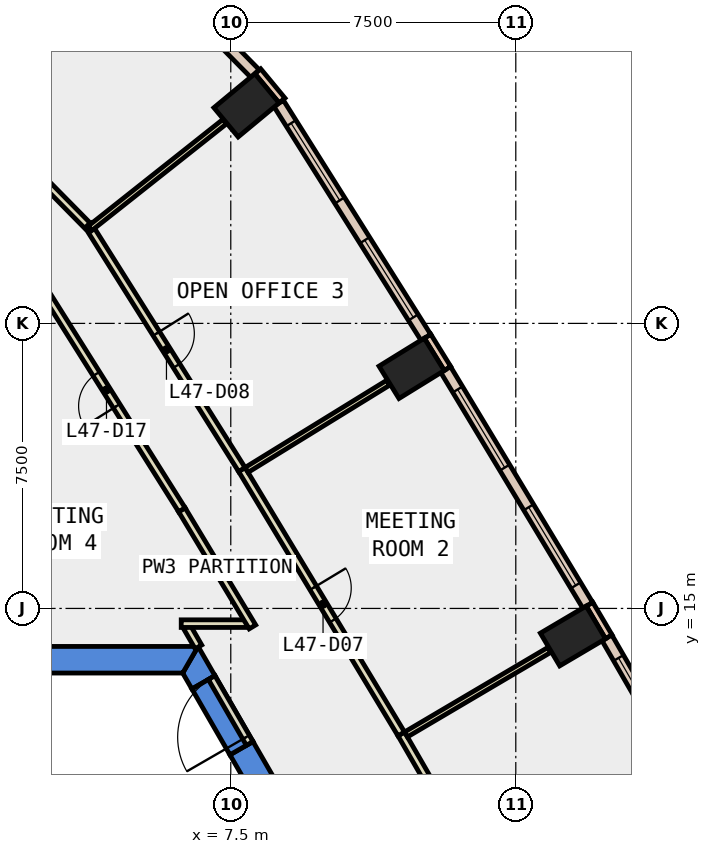
"""IFC4 building model, lengths in metres.
Left out: names, types, materials, properties, quantities, classifications, styles, units other than length and angle.
Written with IfcOpenShell. Run it as: python <this file> out.ifc"""

import sys

from ifc_helpers import new_model, si_unit, direction, frame, frame_2d, origin, origin_2d, place, context, subcontext, project, spatial, polyline, rectangle, outline, extrude, element, fill, save


model = new_model("IFC4")
c1 = context("Model", 3, precision=1e-05, world=origin(), true_north=direction((0.0, 1.0)))
c2 = subcontext(c1, "Body", "Model", "MODEL_VIEW")
j1 = project(units=[si_unit("LENGTHUNIT", "METRE"), si_unit("PLANEANGLEUNIT", "RADIAN")], contexts=[c1])
p1 = place(None, origin())
s1 = spatial("IfcSite", under=j1, at=p1, CompositionType="ELEMENT")
p2 = place(p1, origin())
s2 = spatial("IfcBuilding", under=s1, at=p2, CompositionType="ELEMENT")
p3 = place(p2, frame((0.0, 0.0, 210.8)))
s3 = spatial("IfcBuildingStorey", under=s2, at=p3, CompositionType="ELEMENT", Elevation=210.8)
for number, where, z_axis, x_axis in (
    (1, (16.504, 14.275, -0.4), (0.0, 0.0, 1.0), (-0.509, 0.861, 0.0)),
    (2, (12.259, 21.317, -0.4), (0.0, 0.0, 1.0), (-0.525, 0.851, 0.0)),
    (3, (7.914, 28.238, -0.4), (0.0, 0.0, 1.0), (-0.639, 0.769, 0.0)),
):
    element("IfcColumn", number, at=place(p3, frame(where, z_axis=z_axis, x_axis=x_axis)), inside=s3, PredefinedType="COLUMN", context=c2, shape_type="SweptSolid", body=[
        extrude(rectangle(XDim=1.0, YDim=1.4, at=origin_2d()), origin(), (0.0, 0.0, 1.0), 4.2),
    ])
p4 = place(p3, frame((0.0, 0.0, -0.4)))
e4 = element("IfcWall", 4, at=p4, inside=s3, PredefinedType="SHEAR", context=c2, shape_type="SweptSolid", body=[
    extrude(outline(polyline([(8.084, 11.498), (7.478, 11.148), (12.471, 2.5), (13.279, 2.5), (8.084, 11.498)])), origin(), (0.0, 0.0, 1.0), 4.2),
])
p5 = place(p3, frame((0.0, 0.0, -0.4)))
e5 = element("IfcWall", 5, at=p5, inside=s3, PredefinedType="SHEAR", context=c2, shape_type="SweptSolid", body=[
    extrude(outline(polyline([(6.478, 12.88), (7.084, 13.23), (6.64, 14.0), (6.235, 13.3), (6.478, 12.88)])), origin(), (0.0, 0.0, 1.0), 4.2),
])
p6 = place(p3, frame((0.0, 0.0, 3.6)))
e6 = element("IfcWall", 6, at=p6, inside=s3, PredefinedType="SHEAR", context=c2, shape_type="SweptSolid", body=[
    extrude(outline(polyline([(7.084, 13.23), (6.478, 12.88), (7.478, 11.148), (8.084, 11.498), (7.084, 13.23)])), origin(), (0.0, 0.0, 1.0), 0.2),
])
p7 = place(p3, frame((0.0, 0.0, -0.4)))
e7 = element("IfcWall", 7, at=p7, inside=s3, PredefinedType="SHEAR", context=c2, shape_type="SweptSolid", body=[
    extrude(outline(polyline([(6.64, 14.0), (-6.64, 14.0), (-6.235, 13.3), (6.235, 13.3), (6.64, 14.0)])), origin(), (0.0, 0.0, 1.0), 4.2),
])
p8 = place(p3, frame((17.447, 14.252, 0.0), z_axis=(0.0, 0.0, 1.0), x_axis=(-0.508161541526, 0.861261776531, 0.0)))
e8 = element("IfcWall", 8, at=p8, inside=s3, PredefinedType="STANDARD", context=c2, shape_type="SweptSolid", body=[
    extrude(rectangle(XDim=1.0, YDim=0.2, at=frame_2d((0.5, 0.0))), origin(), (0.0, 0.0, 1.0), 3.8),
])
p9 = place(p3, frame((13.203, 21.312, 0.0), z_axis=(0.0, 0.0, 1.0), x_axis=(-0.525648735675, 0.850701714282, 0.0)))
e9 = element("IfcWall", 9, at=p9, inside=s3, PredefinedType="STANDARD", context=c2, shape_type="SweptSolid", body=[
    extrude(rectangle(XDim=1.0, YDim=0.2, at=frame_2d((0.5, 0.0))), origin(), (0.0, 0.0, 1.0), 3.8),
])
p10 = place(p3, frame((8.849, 28.364, 0.0), z_axis=(0.0, 0.0, 1.0), x_axis=(-0.638117112481, 0.769939316283, 0.0)))
e10 = element("IfcWall", 10, at=p10, inside=s3, PredefinedType="STANDARD", context=c2, shape_type="SweptSolid", body=[
    extrude(rectangle(XDim=1.0, YDim=0.2, at=frame_2d((0.5, 0.0))), origin(), (0.0, 0.0, 1.0), 3.8),
])
p11 = place(p3, frame((21.019, 7.955, 0.0), z_axis=(0.0, 0.0, 1.0), x_axis=(-0.500012402131, 0.866018243292, 0.0)))
e11 = element("IfcWall", 11, at=p11, inside=s3, PredefinedType="STANDARD", context=c2, shape_type="SweptSolid", body=[
    extrude(rectangle(XDim=7.24, YDim=0.3, at=frame_2d((3.62, 0.0))), origin(), (0.0, 0.0, 1.0), 3.8),
])
p12 = place(p11, frame((0.61, 0.0, 0.9)))
e12 = element("IfcOpeningElement", 12, at=p12, cuts=e11, PredefinedType="OPENING", context=c2, shape_type="SweptSolid", body=[
    extrude(rectangle(XDim=2.4, YDim=2.6, at=frame_2d((1.2, 1.3))), frame((0.0, 0.16, 0.0), z_axis=(0.0, -1.0, 0.0), x_axis=(1.0, 0.0, 0.0)), (0.0, 0.0, 1.0), 0.32),
])
p13 = place(p11, frame((4.23, 0.0, 0.9)))
e13 = element("IfcOpeningElement", 13, at=p13, cuts=e11, PredefinedType="OPENING", context=c2, shape_type="SweptSolid", body=[
    extrude(rectangle(XDim=2.4, YDim=2.6, at=frame_2d((1.2, 1.3))), frame((0.0, 0.16, 0.0), z_axis=(0.0, -1.0, 0.0), x_axis=(1.0, 0.0, 0.0)), (0.0, 0.0, 1.0), 0.32),
])
p14 = place(p3, frame((16.892, 15.084, 0.0), z_axis=(0.0, 0.0, 1.0), x_axis=(-0.516230553484, 0.856449657394, 0.0)))
e14 = element("IfcWall", 14, at=p14, inside=s3, PredefinedType="STANDARD", context=c2, shape_type="SweptSolid", body=[
    extrude(rectangle(XDim=7.239, YDim=0.3, at=frame_2d((3.62, 0.0))), origin(), (0.0, 0.0, 1.0), 3.8),
])
p15 = place(p14, frame((0.61, 0.0, 0.9)))
e15 = element("IfcOpeningElement", 15, at=p15, cuts=e14, PredefinedType="OPENING", context=c2, shape_type="SweptSolid", body=[
    extrude(rectangle(XDim=2.4, YDim=2.6, at=frame_2d((1.2, 1.3))), frame((0.0, 0.16, 0.0), z_axis=(0.0, -1.0, 0.0), x_axis=(1.0, 0.0, 0.0)), (0.0, 0.0, 1.0), 0.32),
])
p16 = place(p14, frame((4.229, 0.0, 0.9)))
e16 = element("IfcOpeningElement", 16, at=p16, cuts=e14, PredefinedType="OPENING", context=c2, shape_type="SweptSolid", body=[
    extrude(rectangle(XDim=2.4, YDim=2.6, at=frame_2d((1.2, 1.3))), frame((0.0, 0.16, 0.0), z_axis=(0.0, -1.0, 0.0), x_axis=(1.0, 0.0, 0.0)), (0.0, 0.0, 1.0), 0.32),
])
p17 = place(p3, frame((12.632, 22.134, 0.0), z_axis=(0.0, 0.0, 1.0), x_axis=(-0.532522107002, 0.84641609481, 0.0)))
e17 = element("IfcWall", 17, at=p17, inside=s3, PredefinedType="STANDARD", context=c2, shape_type="SweptSolid", body=[
    extrude(rectangle(XDim=7.273, YDim=0.3, at=frame_2d((3.636, 0.0))), origin(), (0.0, 0.0, 1.0), 3.8),
])
p18 = place(p17, frame((0.618, 0.0, 0.9)))
e18 = element("IfcOpeningElement", 18, at=p18, cuts=e17, PredefinedType="OPENING", context=c2, shape_type="SweptSolid", body=[
    extrude(rectangle(XDim=2.4, YDim=2.6, at=frame_2d((1.2, 1.3))), frame((0.0, 0.16, 0.0), z_axis=(0.0, -1.0, 0.0), x_axis=(1.0, 0.0, 0.0)), (0.0, 0.0, 1.0), 0.32),
])
p19 = place(p17, frame((4.255, 0.0, 0.9)))
e19 = element("IfcOpeningElement", 19, at=p19, cuts=e17, PredefinedType="OPENING", context=c2, shape_type="SweptSolid", body=[
    extrude(rectangle(XDim=2.4, YDim=2.6, at=frame_2d((1.2, 1.3))), frame((0.0, 0.16, 0.0), z_axis=(0.0, -1.0, 0.0), x_axis=(1.0, 0.0, 0.0)), (0.0, 0.0, 1.0), 0.32),
])
p20 = place(p3, frame((8.139, 29.073, 0.0), z_axis=(0.0, 0.0, 1.0), x_axis=(-0.70209072612, 0.712087503258, 0.0)))
e20 = element("IfcWall", 20, at=p20, inside=s3, PredefinedType="STANDARD", context=c2, shape_type="SweptSolid", body=[
    extrude(rectangle(XDim=4.005, YDim=0.3, at=frame_2d((2.002, 0.0))), origin(), (0.0, 0.0, 1.0), 3.8),
])
p21 = place(p20, frame((1.303, 0.0, 0.9)))
e21 = element("IfcOpeningElement", 21, at=p21, cuts=e20, PredefinedType="OPENING", context=c2, shape_type="SweptSolid", body=[
    extrude(rectangle(XDim=1.4, YDim=2.6, at=frame_2d((0.7, 1.3))), frame((0.0, 0.16, 0.0), z_axis=(0.0, -1.0, 0.0), x_axis=(1.0, 0.0, 0.0)), (0.0, 0.0, 1.0), 0.32),
])
p22 = place(p3, frame((6.649, 13.988, 0.0), z_axis=(0.0, 0.0, 1.0), x_axis=(-0.499908430952, 0.866078264744, 0.0)))
e22 = element("IfcWall", 22, at=p22, inside=s3, PredefinedType="PARTITIONING", context=c2, shape_type="SweptSolid", body=[
    extrude(rectangle(XDim=0.606, YDim=0.2, at=frame_2d((0.303, 0.0))), origin(), (0.0, 0.0, 1.0), 3.8),
])
p23 = place(p3, frame((6.196, 14.6, 0.0), z_axis=(0.0, 0.0, 1.0), x_axis=(1.0, 0.0, 0.0)))
e23 = element("IfcWall", 23, at=p23, inside=s3, PredefinedType="PARTITIONING", context=c2, shape_type="SweptSolid", body=[
    extrude(rectangle(XDim=1.722, YDim=0.2, at=frame_2d((0.861, 0.0))), origin(), (0.0, 0.0, 1.0), 3.8),
])
p24 = place(p3, frame((8.07, 14.514, 0.0), z_axis=(0.0, 0.0, 1.0), x_axis=(-0.51624118739, 0.856443247648, 0.0)))
e24 = element("IfcWall", 24, at=p24, inside=s3, PredefinedType="PARTITIONING", context=c2, shape_type="SweptSolid", body=[
    extrude(rectangle(XDim=3.597, YDim=0.2, at=frame_2d((1.799, 0.0))), origin(), (0.0, 0.0, 1.0), 3.8),
])
p25 = place(p3, frame((6.213, 17.595, 0.0), z_axis=(0.0, 0.0, 1.0), x_axis=(-0.532527247309, 0.846412860768, 0.0)))
e25 = element("IfcWall", 25, at=p25, inside=s3, PredefinedType="PARTITIONING", context=c2, shape_type="SweptSolid", body=[
    extrude(rectangle(XDim=7.449, YDim=0.2, at=frame_2d((3.725, 0.0))), origin(), (0.0, 0.0, 1.0), 3.8),
])
p26 = place(p25, frame((3.225, 0.0, 0.0)))
e26 = element("IfcOpeningElement", 26, at=p26, cuts=e25, PredefinedType="OPENING", context=c2, shape_type="SweptSolid", body=[
    extrude(rectangle(XDim=1.0, YDim=2.1, at=frame_2d((0.5, 1.05))), frame((0.0, 0.11, 0.0), z_axis=(0.0, -1.0, 0.0), x_axis=(1.0, 0.0, 0.0)), (0.0, 0.0, 1.0), 0.22),
])
p27 = place(p3, frame((11.987, 11.698, 0.0), z_axis=(0.0, 0.0, 1.0), x_axis=(0.500075329254, -0.865981908051, 0.0)))
e27 = element("IfcWall", 27, at=p27, inside=s3, PredefinedType="PARTITIONING", context=c2, shape_type="SweptSolid", body=[
    extrude(rectangle(XDim=8.125, YDim=0.2, at=frame_2d((4.062, 0.0))), origin(), (0.0, 0.0, 1.0), 3.8),
])
p28 = place(p27, frame((3.637, 0.0, 0.0)))
e28 = element("IfcOpeningElement", 28, at=p28, cuts=e27, PredefinedType="OPENING", context=c2, shape_type="SweptSolid", body=[
    extrude(rectangle(XDim=1.0, YDim=2.1, at=frame_2d((0.5, 1.05))), frame((0.0, 0.11, 0.0), z_axis=(0.0, -1.0, 0.0), x_axis=(1.0, 0.0, 0.0)), (0.0, 0.0, 1.0), 0.22),
])
p29 = place(p3, frame((7.792, 18.655, 0.0), z_axis=(0.0, 0.0, 1.0), x_axis=(0.516293428925, -0.856411755669, 0.0)))
e29 = element("IfcWall", 29, at=p29, inside=s3, PredefinedType="PARTITIONING", context=c2, shape_type="SweptSolid", body=[
    extrude(rectangle(XDim=8.124, YDim=0.2, at=frame_2d((4.062, 0.0))), origin(), (0.0, 0.0, 1.0), 3.8),
])
p30 = place(p29, frame((3.637, 0.0, 0.0)))
e30 = element("IfcOpeningElement", 30, at=p30, cuts=e29, PredefinedType="OPENING", context=c2, shape_type="SweptSolid", body=[
    extrude(rectangle(XDim=1.0, YDim=2.1, at=frame_2d((0.5, 1.05))), frame((0.0, 0.11, 0.0), z_axis=(0.0, -1.0, 0.0), x_axis=(1.0, 0.0, 0.0)), (0.0, 0.0, 1.0), 0.22),
])
p31 = place(p3, frame((3.744, 25.087, 0.0), z_axis=(0.0, 0.0, 1.0), x_axis=(0.532569549341, -0.846386244639, 0.0)))
e31 = element("IfcWall", 31, at=p31, inside=s3, PredefinedType="PARTITIONING", context=c2, shape_type="SweptSolid", body=[
    extrude(rectangle(XDim=7.599, YDim=0.2, at=frame_2d((3.8, 0.0))), origin(), (0.0, 0.0, 1.0), 3.8),
])
p32 = place(p31, frame((3.375, 0.0, 0.0)))
e32 = element("IfcOpeningElement", 32, at=p32, cuts=e31, PredefinedType="OPENING", context=c2, shape_type="SweptSolid", body=[
    extrude(rectangle(XDim=1.0, YDim=2.1, at=frame_2d((0.5, 1.05))), frame((0.0, 0.11, 0.0), z_axis=(0.0, -1.0, 0.0), x_axis=(1.0, 0.0, 0.0)), (0.0, 0.0, 1.0), 0.22),
])
p33 = place(p3, frame((1.773, 27.056, 0.0), z_axis=(0.0, 0.0, 1.0), x_axis=(0.702089218366, -0.712088989842, 0.0)))
e33 = element("IfcWall", 33, at=p33, inside=s3, PredefinedType="PARTITIONING", context=c2, shape_type="SweptSolid", body=[
    extrude(rectangle(XDim=2.783, YDim=0.2, at=frame_2d((1.392, 0.0))), origin(), (0.0, 0.0, 1.0), 3.8),
])
p34 = place(p3, frame((12.111, 11.684, 0.0), z_axis=(0.0, 0.0, 1.0), x_axis=(0.861290233547, 0.508113307833, 0.0)))
e34 = element("IfcWall", 34, at=p34, inside=s3, PredefinedType="PARTITIONING", context=c2, shape_type="SweptSolid", body=[
    extrude(rectangle(XDim=4.381, YDim=0.15, at=frame_2d((2.19, 0.0))), origin(), (0.0, 0.0, 1.0), 3.8),
])
p35 = place(p3, frame((7.916, 18.644, 0.0), z_axis=(0.0, 0.0, 1.0), x_axis=(0.851543444049, 0.524284047914, 0.0)))
e35 = element("IfcWall", 35, at=p35, inside=s3, PredefinedType="PARTITIONING", context=c2, shape_type="SweptSolid", body=[
    extrude(rectangle(XDim=4.379, YDim=0.15, at=frame_2d((2.189, 0.0))), origin(), (0.0, 0.0, 1.0), 3.8),
])
p36 = place(p3, frame((3.797, 25.003, 0.0), z_axis=(0.0, 0.0, 1.0), x_axis=(0.783893371826, 0.620895467536, 0.0)))
e36 = element("IfcWall", 36, at=p36, inside=s3, PredefinedType="PARTITIONING", context=c2, shape_type="SweptSolid", body=[
    extrude(rectangle(XDim=4.514, YDim=0.15, at=frame_2d((2.257, 0.0))), origin(), (0.0, 0.0, 1.0), 3.8),
])
p37 = place(p3, frame((7.997, 11.448, 0.0), z_axis=(0.0, 0.0, 1.0), x_axis=(-0.50002537861, 0.866010750942, 0.0)))
e37 = element("IfcWall", 37, at=p37, inside=s3, PredefinedType="PARTITIONING", context=c2, shape_type="SweptSolid", body=[
    extrude(rectangle(XDim=2.0, YDim=0.2, at=frame_2d((1.0, 0.0))), origin(), (0.0, 0.0, 1.0), 2.4),
])
p38 = place(p37, frame((0.19, 0.0, 0.0)))
e38 = element("IfcOpeningElement", 38, at=p38, cuts=e37, PredefinedType="OPENING", context=c2, shape_type="SweptSolid", body=[
    extrude(rectangle(XDim=1.8, YDim=2.1, at=frame_2d((0.9, 1.05))), frame((0.0, 0.11, 0.0), z_axis=(0.0, -1.0, 0.0), x_axis=(1.0, 0.0, 0.0)), (0.0, 0.0, 1.0), 0.22),
])
p39 = place(p13, origin())
e39 = element("IfcWindow", 39, at=p39, inside=s3, PartitioningType="SINGLE_PANEL", PredefinedType="WINDOW", context=c2, shape_type="SweptSolid", body=[
    extrude(rectangle(XDim=2.4, YDim=2.6, at=frame_2d((1.2, 1.3))), frame((0.0, 0.03, 0.0), z_axis=(0.0, -1.0, 0.0), x_axis=(1.0, 0.0, 0.0)), (0.0, 0.0, 1.0), 0.06),
])
fill(e13, e39)
p40 = place(p15, origin())
e40 = element("IfcWindow", 40, at=p40, inside=s3, PartitioningType="SINGLE_PANEL", PredefinedType="WINDOW", context=c2, shape_type="SweptSolid", body=[
    extrude(rectangle(XDim=2.4, YDim=2.6, at=frame_2d((1.2, 1.3))), frame((0.0, 0.03, 0.0), z_axis=(0.0, -1.0, 0.0), x_axis=(1.0, 0.0, 0.0)), (0.0, 0.0, 1.0), 0.06),
])
fill(e15, e40)
p41 = place(p16, origin())
e41 = element("IfcWindow", 41, at=p41, inside=s3, PartitioningType="SINGLE_PANEL", PredefinedType="WINDOW", context=c2, shape_type="SweptSolid", body=[
    extrude(rectangle(XDim=2.4, YDim=2.6, at=frame_2d((1.2, 1.3))), frame((0.0, 0.03, 0.0), z_axis=(0.0, -1.0, 0.0), x_axis=(1.0, 0.0, 0.0)), (0.0, 0.0, 1.0), 0.06),
])
fill(e16, e41)
p42 = place(p18, origin())
e42 = element("IfcWindow", 42, at=p42, inside=s3, PartitioningType="SINGLE_PANEL", PredefinedType="WINDOW", context=c2, shape_type="SweptSolid", body=[
    extrude(rectangle(XDim=2.4, YDim=2.6, at=frame_2d((1.2, 1.3))), frame((0.0, 0.03, 0.0), z_axis=(0.0, -1.0, 0.0), x_axis=(1.0, 0.0, 0.0)), (0.0, 0.0, 1.0), 0.06),
])
fill(e18, e42)
p43 = place(p19, origin())
e43 = element("IfcWindow", 43, at=p43, inside=s3, PartitioningType="SINGLE_PANEL", PredefinedType="WINDOW", context=c2, shape_type="SweptSolid", body=[
    extrude(rectangle(XDim=2.4, YDim=2.6, at=frame_2d((1.2, 1.3))), frame((0.0, 0.03, 0.0), z_axis=(0.0, -1.0, 0.0), x_axis=(1.0, 0.0, 0.0)), (0.0, 0.0, 1.0), 0.06),
])
fill(e19, e43)
p44 = place(p30, origin())
e44 = element("IfcDoor", 44, at=p44, inside=s3, OperationType="SINGLE_SWING_RIGHT", PredefinedType="DOOR", context=c2, shape_type="SweptSolid", body=[
    extrude(rectangle(XDim=1.0, YDim=2.1, at=frame_2d((0.5, 1.05))), frame((0.0, 0.025, 0.0), z_axis=(0.0, -1.0, 0.0), x_axis=(1.0, 0.0, 0.0)), (0.0, 0.0, 1.0), 0.05),
])
fill(e30, e44)
p45 = place(p32, origin())
e45 = element("IfcDoor", 45, at=p45, inside=s3, OperationType="SINGLE_SWING_LEFT", PredefinedType="DOOR", context=c2, shape_type="SweptSolid", body=[
    extrude(rectangle(XDim=1.0, YDim=2.1, at=frame_2d((0.5, 1.05))), frame((0.0, 0.025, 0.0), z_axis=(0.0, -1.0, 0.0), x_axis=(1.0, 0.0, 0.0)), (0.0, 0.0, 1.0), 0.05),
])
fill(e32, e45)
p46 = place(p26, origin())
e46 = element("IfcDoor", 46, at=p46, inside=s3, OperationType="SINGLE_SWING_LEFT", PredefinedType="DOOR", context=c2, shape_type="SweptSolid", body=[
    extrude(rectangle(XDim=1.0, YDim=2.1, at=frame_2d((0.5, 1.05))), frame((0.0, 0.025, 0.0), z_axis=(0.0, -1.0, 0.0), x_axis=(1.0, 0.0, 0.0)), (0.0, 0.0, 1.0), 0.05),
])
fill(e26, e46)
p47 = place(p38, origin())
e47 = element("IfcDoor", 47, at=p47, inside=s3, OperationType="DOUBLE_DOOR_SINGLE_SWING", PredefinedType="DOOR", context=c2, shape_type="SweptSolid", body=[
    extrude(rectangle(XDim=1.8, YDim=2.1, at=frame_2d((0.9, 1.05))), frame((0.0, 0.025, 0.0), z_axis=(0.0, -1.0, 0.0), x_axis=(1.0, 0.0, 0.0)), (0.0, 0.0, 1.0), 0.05),
])
fill(e38, e47)
save(model, sys.argv[1])
